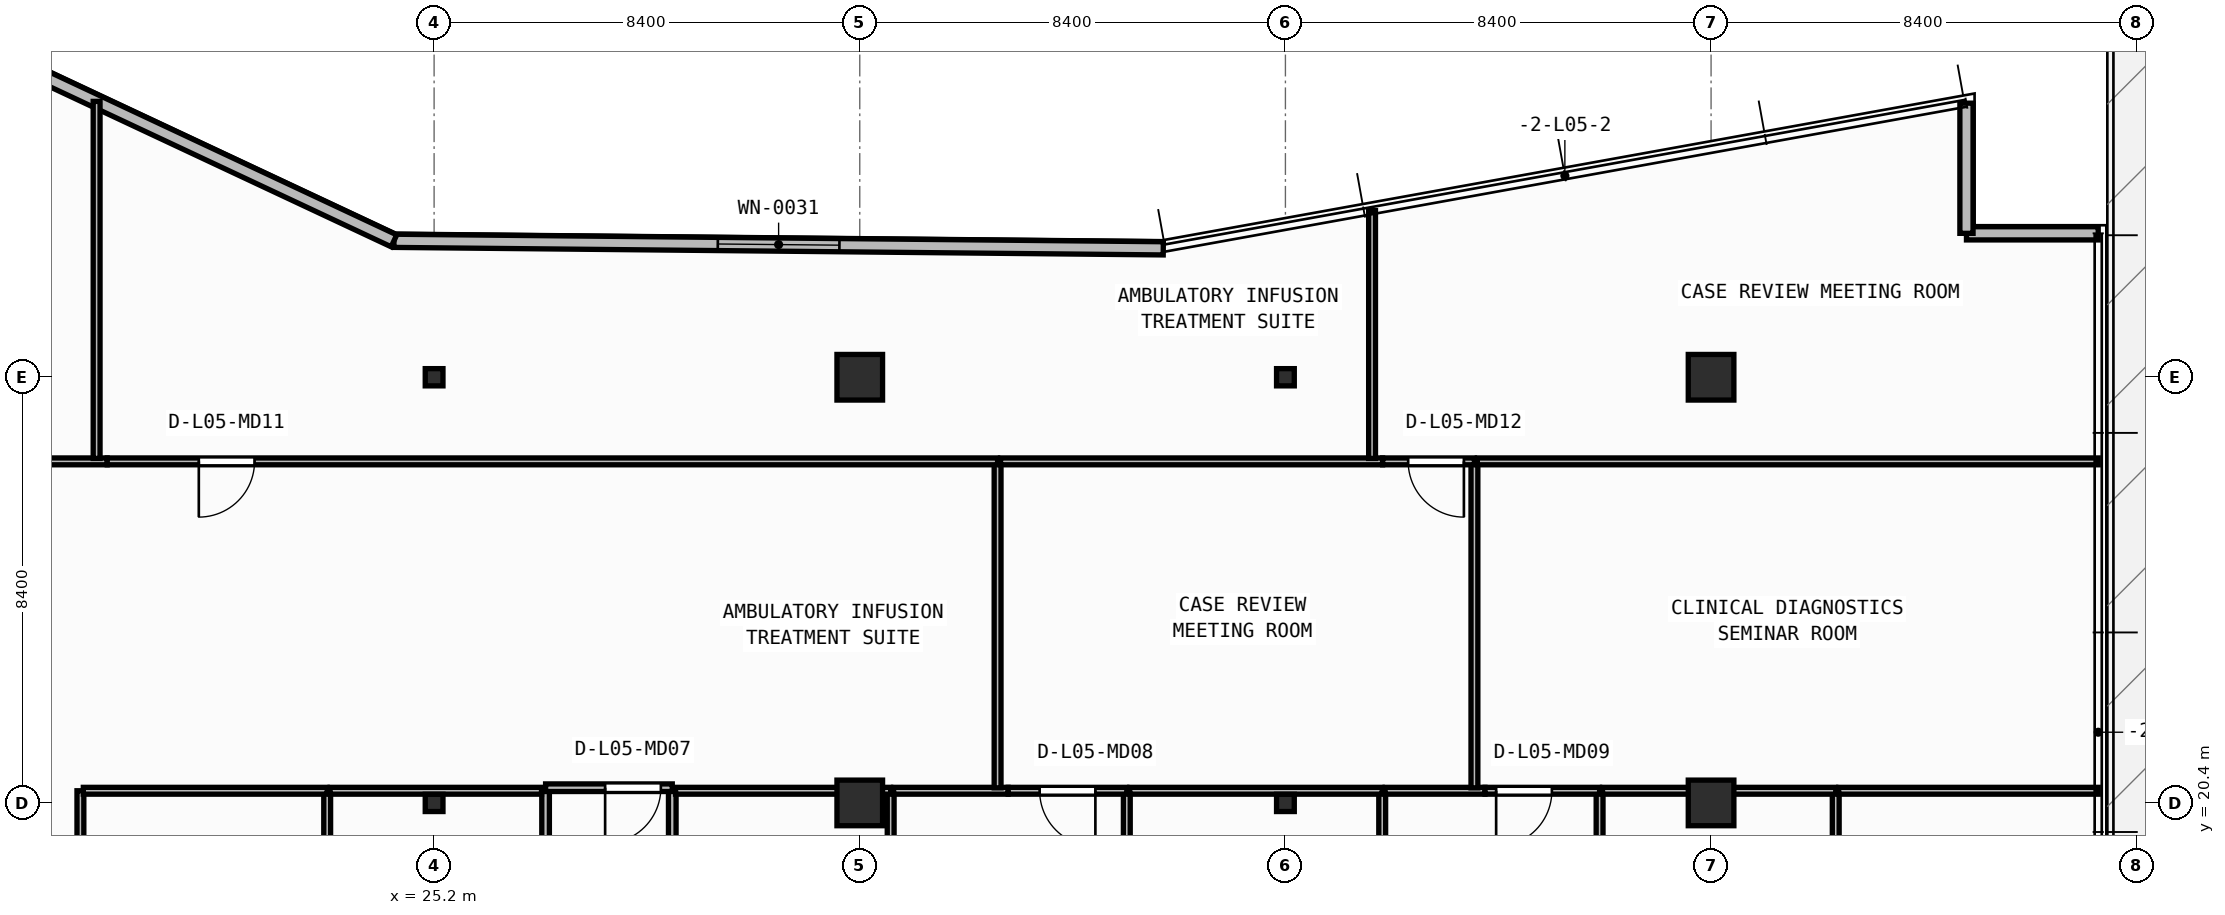
"""IFC4 building model, lengths in metres.
Left out: names, types, materials, properties, quantities, classifications, styles, units other than length and angle.
Written with IfcOpenShell. Run it as: python <this file> out.ifc"""

import sys

from ifc_helpers import new_model, si_unit, direction, frame, frame_2d, origin, origin_2d, place, context, subcontext, project, spatial, rectangle, i_section, extrude, element, fill, save


model = new_model("IFC4")
c1 = context("Model", 3, precision=1e-05, world=origin(), true_north=direction((0.0, 1.0)))
c2 = subcontext(c1, "Body", "Model", "MODEL_VIEW")
j1 = project(units=[si_unit("LENGTHUNIT", "METRE"), si_unit("PLANEANGLEUNIT", "RADIAN")], contexts=[c1])
p1 = place(None, origin())
s1 = spatial("IfcSite", under=j1, at=p1, CompositionType="ELEMENT")
p2 = place(p1, origin())
s2 = spatial("IfcBuilding", under=s1, at=p2, CompositionType="ELEMENT")
p3 = place(p2, frame((0.0, 0.0, 22.5)))
s3 = spatial("IfcBuildingStorey", under=s2, at=p3, CompositionType="ELEMENT", Elevation=22.5)
p4 = place(p3, frame((25.2, 20.4, 0.0), z_axis=(0.0, 0.0, 1.0), x_axis=(1.0, 0.0, 0.0)))
e1 = element("IfcColumn", 1, at=p4, inside=s3, PredefinedType="COLUMN", context=c2, shape_type="SweptSolid", body=[
    extrude(i_section(OverallWidth=0.35, OverallDepth=0.34, WebThickness=0.016, FlangeThickness=0.028, at=origin_2d()), origin(), (0.0, 0.0, 1.0), 3.95),
])
p5 = place(p3, frame((33.6, 20.4, 0.0), z_axis=(0.0, 0.0, 1.0), x_axis=(1.0, 0.0, 0.0)))
e2 = element("IfcColumn", 2, at=p5, inside=s3, PredefinedType="COLUMN", context=c2, shape_type="SweptSolid", body=[
    extrude(rectangle(XDim=0.9, YDim=0.9, at=origin_2d()), origin(), (0.0, 0.0, 1.0), 3.95),
])
p6 = place(p3, frame((42.0, 20.4, 0.0), z_axis=(0.0, 0.0, 1.0), x_axis=(1.0, 0.0, 0.0)))
e3 = element("IfcColumn", 3, at=p6, inside=s3, PredefinedType="COLUMN", context=c2, shape_type="SweptSolid", body=[
    extrude(i_section(OverallWidth=0.35, OverallDepth=0.34, WebThickness=0.016, FlangeThickness=0.028, at=origin_2d()), origin(), (0.0, 0.0, 1.0), 3.95),
])
p7 = place(p3, frame((50.4, 20.4, 0.0), z_axis=(0.0, 0.0, 1.0), x_axis=(1.0, 0.0, 0.0)))
e4 = element("IfcColumn", 4, at=p7, inside=s3, PredefinedType="COLUMN", context=c2, shape_type="SweptSolid", body=[
    extrude(rectangle(XDim=0.9, YDim=0.9, at=origin_2d()), origin(), (0.0, 0.0, 1.0), 3.95),
])
p8 = place(p3, frame((25.2, 28.8, 0.0), z_axis=(0.0, 0.0, 1.0), x_axis=(1.0, 0.0, 0.0)))
e5 = element("IfcColumn", 5, at=p8, inside=s3, PredefinedType="COLUMN", context=c2, shape_type="SweptSolid", body=[
    extrude(i_section(OverallWidth=0.35, OverallDepth=0.34, WebThickness=0.016, FlangeThickness=0.028, at=origin_2d()), origin(), (0.0, 0.0, 1.0), 3.95),
])
p9 = place(p3, frame((33.6, 28.8, 0.0), z_axis=(0.0, 0.0, 1.0), x_axis=(1.0, 0.0, 0.0)))
e6 = element("IfcColumn", 6, at=p9, inside=s3, PredefinedType="COLUMN", context=c2, shape_type="SweptSolid", body=[
    extrude(rectangle(XDim=0.9, YDim=0.9, at=origin_2d()), origin(), (0.0, 0.0, 1.0), 3.95),
])
p10 = place(p3, frame((42.0, 28.8, 0.0), z_axis=(0.0, 0.0, 1.0), x_axis=(1.0, 0.0, 0.0)))
e7 = element("IfcColumn", 7, at=p10, inside=s3, PredefinedType="COLUMN", context=c2, shape_type="SweptSolid", body=[
    extrude(i_section(OverallWidth=0.35, OverallDepth=0.34, WebThickness=0.016, FlangeThickness=0.028, at=origin_2d()), origin(), (0.0, 0.0, 1.0), 3.95),
])
p11 = place(p3, frame((50.4, 28.8, 0.0), z_axis=(0.0, 0.0, 1.0), x_axis=(1.0, 0.0, 0.0)))
e8 = element("IfcColumn", 8, at=p11, inside=s3, PredefinedType="COLUMN", context=c2, shape_type="SweptSolid", body=[
    extrude(rectangle(XDim=0.9, YDim=0.9, at=origin_2d()), origin(), (0.0, 0.0, 1.0), 3.95),
])
p12 = place(p3, frame((58.04, 31.64, 0.0), z_axis=(0.0, 0.0, 1.0), x_axis=(-1.0, 0.0, 0.0)))
e9 = element("IfcWall", 9, at=p12, inside=s3, PredefinedType="STANDARD", context=c2, shape_type="SweptSolid", body=[
    extrude(rectangle(XDim=2.6, YDim=0.26, at=frame_2d((1.3, 0.0))), origin(), (0.0, 0.0, 1.0), 3.71),
])
p13 = place(p3, frame((55.44, 31.64, 0.0), z_axis=(0.0, 0.0, 1.0), x_axis=(0.0, 1.0, 0.0)))
e10 = element("IfcWall", 10, at=p13, inside=s3, PredefinedType="STANDARD", context=c2, shape_type="SweptSolid", body=[
    extrude(rectangle(XDim=2.569, YDim=0.26, at=frame_2d((1.284, 0.0))), origin(), (0.0, 0.0, 1.0), 3.71),
])
p14 = place(p3, frame((39.59, 31.344, 0.0), z_axis=(0.0, 0.0, 1.0), x_axis=(-0.999952362926, 0.009760731435, 0.0)))
e11 = element("IfcWall", 11, at=p14, inside=s3, PredefinedType="STANDARD", context=c2, shape_type="SweptSolid", body=[
    extrude(rectangle(XDim=15.183, YDim=0.26, at=frame_2d((7.591, 0.0))), origin(), (0.0, 0.0, 1.0), 3.71),
])
p15 = place(p14, frame((6.391, 0.0, 0.9)))
e12 = element("IfcOpeningElement", 12, at=p15, cuts=e11, PredefinedType="OPENING", context=c2, shape_type="SweptSolid", body=[
    extrude(rectangle(XDim=2.4, YDim=1.65, at=frame_2d((1.2, 0.825))), frame((0.0, 0.14, 0.0), z_axis=(0.0, -1.0, 0.0), x_axis=(1.0, 0.0, 0.0)), (0.0, 0.0, 1.0), 0.28),
])
p16 = place(p3, frame((24.408, 31.492, 0.0), z_axis=(0.0, 0.0, 1.0), x_axis=(-0.905396522918, 0.424566998585, 0.0)))
e13 = element("IfcWall", 13, at=p16, inside=s3, PredefinedType="STANDARD", context=c2, shape_type="SweptSolid", body=[
    extrude(rectangle(XDim=14.189, YDim=0.26, at=frame_2d((7.095, 0.0))), origin(), (0.0, 0.0, 1.0), 3.71),
])
p17 = place(p16, frame((9.145, 0.0, 0.9)))
e14 = element("IfcOpeningElement", 14, at=p17, cuts=e13, PredefinedType="OPENING", context=c2, shape_type="SweptSolid", body=[
    extrude(rectangle(XDim=2.4, YDim=1.65, at=frame_2d((1.2, 0.825))), frame((0.0, 0.14, 0.0), z_axis=(0.0, -1.0, 0.0), x_axis=(1.0, 0.0, 0.0)), (0.0, 0.0, 1.0), 0.28),
])
for number, where, z_axis, x_axis in (
    (15, (27.4, 20.7, 0.0), (0.0, 0.0, 1.0), (0.0, -1.0, 0.0)),
    (16, (29.9, 14.7, 0.0), (0.0, 0.0, 1.0), (0.0, 1.0, 0.0)),
):
    element("IfcWall", number, at=place(p3, frame(where, z_axis=z_axis, x_axis=x_axis)), inside=s3, PredefinedType="PARTITIONING", context=c2, shape_type="SweptSolid", body=[
        extrude(rectangle(XDim=6.0, YDim=0.15, at=frame_2d((3.0, 0.0))), origin(), (0.0, 0.0, 1.0), 3.71),
    ])
p18 = place(p3, frame((29.9, 20.7, 0.0), z_axis=(0.0, 0.0, 1.0), x_axis=(-1.0, 0.0, 0.0)))
e17 = element("IfcWall", 17, at=p18, inside=s3, PredefinedType="PARTITIONING", context=c2, shape_type="SweptSolid", body=[
    extrude(rectangle(XDim=2.5, YDim=0.15, at=frame_2d((1.25, 0.0))), origin(), (0.0, 0.0, 1.0), 3.073),
])
p19 = place(p18, frame((0.225, 0.0, 0.0)))
e18 = element("IfcOpeningElement", 18, at=p19, cuts=e17, PredefinedType="OPENING", context=c2, shape_type="SweptSolid", body=[
    extrude(rectangle(XDim=1.1, YDim=2.1, at=frame_2d((0.55, 1.05))), frame((0.0, 0.085, 0.0), z_axis=(0.0, -1.0, 0.0), x_axis=(1.0, 0.0, 0.0)), (0.0, 0.0, 1.0), 0.17),
])
p20 = place(p3, frame((18.22, 17.833, 0.0), z_axis=(0.0, 0.0, 1.0), x_axis=(0.0, 1.0, 0.0)))
e19 = element("IfcWall", 19, at=p20, inside=s3, PredefinedType="PARTITIONING", context=c2, shape_type="SweptSolid", body=[
    extrude(rectangle(XDim=2.807, YDim=0.135, at=frame_2d((1.404, 0.0))), origin(), (0.0, 0.0, 1.0), 3.71),
])
p21 = place(p3, frame((23.09, 14.76, 0.0), z_axis=(0.0, 0.0, 1.0), x_axis=(0.0, 1.0, 0.0)))
e20 = element("IfcWall", 20, at=p21, inside=s3, PredefinedType="PARTITIONING", context=c2, shape_type="SweptSolid", body=[
    extrude(rectangle(XDim=5.88, YDim=0.135, at=frame_2d((2.94, 0.0))), origin(), (0.0, 0.0, 1.0), 3.71),
])
p22 = place(p3, frame((23.09, 20.64, 0.0), z_axis=(0.0, 0.0, 1.0), x_axis=(-1.0, 0.0, 0.0)))
e21 = element("IfcWall", 21, at=p22, inside=s3, PredefinedType="PARTITIONING", context=c2, shape_type="SweptSolid", body=[
    extrude(rectangle(XDim=4.812, YDim=0.135, at=frame_2d((2.406, 0.0))), origin(), (0.0, 0.0, 1.0), 3.073),
])
p23 = place(p3, frame((27.32, 20.64, 0.0), z_axis=(0.0, 0.0, 1.0), x_axis=(-1.0, 0.0, 0.0)))
e22 = element("IfcWall", 22, at=p23, inside=s3, PredefinedType="PARTITIONING", context=c2, shape_type="SweptSolid", body=[
    extrude(rectangle(XDim=4.173, YDim=0.135, at=frame_2d((2.086, 0.0))), origin(), (0.0, 0.0, 1.0), 3.073),
])
p24 = place(p3, frame((34.21, 17.833, 0.0), z_axis=(0.0, 0.0, 1.0), x_axis=(0.0, 1.0, 0.0)))
e23 = element("IfcWall", 23, at=p24, inside=s3, PredefinedType="PARTITIONING", context=c2, shape_type="SweptSolid", body=[
    extrude(rectangle(XDim=2.807, YDim=0.135, at=frame_2d((1.404, 0.0))), origin(), (0.0, 0.0, 1.0), 3.71),
])
p25 = place(p3, frame((34.21, 20.64, 0.0), z_axis=(0.0, 0.0, 1.0), x_axis=(-1.0, 0.0, 0.0)))
e24 = element("IfcWall", 24, at=p25, inside=s3, PredefinedType="PARTITIONING", context=c2, shape_type="SweptSolid", body=[
    extrude(rectangle(XDim=4.245, YDim=0.135, at=frame_2d((2.123, 0.0))), origin(), (0.0, 0.0, 1.0), 3.073),
])
p26 = place(p3, frame((38.87, 14.76, 0.0), z_axis=(0.0, 0.0, 1.0), x_axis=(0.0, 1.0, 0.0)))
e25 = element("IfcWall", 25, at=p26, inside=s3, PredefinedType="PARTITIONING", context=c2, shape_type="SweptSolid", body=[
    extrude(rectangle(XDim=5.88, YDim=0.135, at=frame_2d((2.94, 0.0))), origin(), (0.0, 0.0, 1.0), 3.71),
])
p27 = place(p3, frame((36.528, 20.64, 0.0), z_axis=(0.0, 0.0, 1.0), x_axis=(-1.0, 0.0, 0.0)))
e26 = element("IfcWall", 26, at=p27, inside=s3, PredefinedType="PARTITIONING", context=c2, shape_type="SweptSolid", body=[
    extrude(rectangle(XDim=2.26, YDim=0.135, at=frame_2d((1.13, 0.0))), origin(), (0.0, 0.0, 1.0), 3.073),
])
p28 = place(p3, frame((38.87, 20.64, 0.0), z_axis=(0.0, 0.0, 1.0), x_axis=(-1.0, 0.0, 0.0)))
e27 = element("IfcWall", 27, at=p28, inside=s3, PredefinedType="PARTITIONING", context=c2, shape_type="SweptSolid", body=[
    extrude(rectangle(XDim=2.341, YDim=0.135, at=frame_2d((1.17, 0.0))), origin(), (0.0, 0.0, 1.0), 3.073),
])
p29 = place(p28, frame((0.62, 0.0, 0.0)))
e28 = element("IfcOpeningElement", 28, at=p29, cuts=e27, PredefinedType="OPENING", context=c2, shape_type="SweptSolid", body=[
    extrude(rectangle(XDim=1.1, YDim=2.1, at=frame_2d((0.55, 1.05))), frame((0.0, 0.077, 0.0), z_axis=(0.0, -1.0, 0.0), x_axis=(1.0, 0.0, 0.0)), (0.0, 0.0, 1.0), 0.155),
])
p30 = place(p3, frame((43.91, 17.833, 0.0), z_axis=(0.0, 0.0, 1.0), x_axis=(0.0, 1.0, 0.0)))
e29 = element("IfcWall", 29, at=p30, inside=s3, PredefinedType="PARTITIONING", context=c2, shape_type="SweptSolid", body=[
    extrude(rectangle(XDim=2.807, YDim=0.135, at=frame_2d((1.404, 0.0))), origin(), (0.0, 0.0, 1.0), 3.71),
])
p31 = place(p3, frame((43.91, 20.64, 0.0), z_axis=(0.0, 0.0, 1.0), x_axis=(-1.0, 0.0, 0.0)))
e30 = element("IfcWall", 30, at=p31, inside=s3, PredefinedType="PARTITIONING", context=c2, shape_type="SweptSolid", body=[
    extrude(rectangle(XDim=4.982, YDim=0.135, at=frame_2d((2.491, 0.0))), origin(), (0.0, 0.0, 1.0), 3.073),
])
p32 = place(p3, frame((48.2, 14.76, 0.0), z_axis=(0.0, 0.0, 1.0), x_axis=(0.0, 1.0, 0.0)))
e31 = element("IfcWall", 31, at=p32, inside=s3, PredefinedType="PARTITIONING", context=c2, shape_type="SweptSolid", body=[
    extrude(rectangle(XDim=5.88, YDim=0.135, at=frame_2d((2.94, 0.0))), origin(), (0.0, 0.0, 1.0), 3.71),
])
p33 = place(p3, frame((45.938, 20.64, 0.0), z_axis=(0.0, 0.0, 1.0), x_axis=(-1.0, 0.0, 0.0)))
e32 = element("IfcWall", 32, at=p33, inside=s3, PredefinedType="PARTITIONING", context=c2, shape_type="SweptSolid", body=[
    extrude(rectangle(XDim=1.97, YDim=0.135, at=frame_2d((0.985, 0.0))), origin(), (0.0, 0.0, 1.0), 3.073),
])
p34 = place(p3, frame((48.2, 20.64, 0.0), z_axis=(0.0, 0.0, 1.0), x_axis=(-1.0, 0.0, 0.0)))
e33 = element("IfcWall", 33, at=p34, inside=s3, PredefinedType="PARTITIONING", context=c2, shape_type="SweptSolid", body=[
    extrude(rectangle(XDim=2.26, YDim=0.135, at=frame_2d((1.13, 0.0))), origin(), (0.0, 0.0, 1.0), 3.073),
])
p35 = place(p34, frame((0.941, 0.0, 0.0)))
e34 = element("IfcOpeningElement", 34, at=p35, cuts=e33, PredefinedType="OPENING", context=c2, shape_type="SweptSolid", body=[
    extrude(rectangle(XDim=1.1, YDim=2.1, at=frame_2d((0.55, 1.05))), frame((0.0, 0.077, 0.0), z_axis=(0.0, -1.0, 0.0), x_axis=(1.0, 0.0, 0.0)), (0.0, 0.0, 1.0), 0.155),
])
p36 = place(p3, frame((52.86, 17.833, 0.0), z_axis=(0.0, 0.0, 1.0), x_axis=(0.0, 1.0, 0.0)))
e35 = element("IfcWall", 35, at=p36, inside=s3, PredefinedType="PARTITIONING", context=c2, shape_type="SweptSolid", body=[
    extrude(rectangle(XDim=2.807, YDim=0.135, at=frame_2d((1.404, 0.0))), origin(), (0.0, 0.0, 1.0), 3.71),
])
p37 = place(p3, frame((52.86, 20.64, 0.0), z_axis=(0.0, 0.0, 1.0), x_axis=(-1.0, 0.0, 0.0)))
e36 = element("IfcWall", 36, at=p37, inside=s3, PredefinedType="PARTITIONING", context=c2, shape_type="SweptSolid", body=[
    extrude(rectangle(XDim=4.603, YDim=0.135, at=frame_2d((2.301, 0.0))), origin(), (0.0, 0.0, 1.0), 3.073),
])
p38 = place(p3, frame((58.04, 20.64, 0.0), z_axis=(0.0, 0.0, 1.0), x_axis=(-1.0, 0.0, 0.0)))
e37 = element("IfcWall", 37, at=p38, inside=s3, PredefinedType="PARTITIONING", context=c2, shape_type="SweptSolid", body=[
    extrude(rectangle(XDim=5.123, YDim=0.135, at=frame_2d((2.561, 0.0))), origin(), (0.0, 0.0, 1.0), 3.71),
])
p39 = place(p3, frame((36.32, 20.698, 0.0), z_axis=(0.0, 0.0, 1.0), x_axis=(0.0, 1.0, 0.0)))
e38 = element("IfcWall", 38, at=p39, inside=s3, PredefinedType="PARTITIONING", context=c2, shape_type="SweptSolid", body=[
    extrude(rectangle(XDim=6.442, YDim=0.135, at=frame_2d((3.221, 0.0))), origin(), (0.0, 0.0, 1.0), 3.71),
])
p40 = place(p3, frame((18.748, 27.14, 0.0), z_axis=(0.0, 0.0, 1.0), x_axis=(-1.0, 0.0, 0.0)))
e39 = element("IfcWall", 39, at=p40, inside=s3, PredefinedType="PARTITIONING", context=c2, shape_type="SweptSolid", body=[
    extrude(rectangle(XDim=1.82, YDim=0.135, at=frame_2d((0.91, 0.0))), origin(), (0.0, 0.0, 1.0), 3.71),
])
p41 = place(p3, frame((36.32, 27.14, 0.0), z_axis=(0.0, 0.0, 1.0), x_axis=(-1.0, 0.0, 0.0)))
e40 = element("IfcWall", 40, at=p41, inside=s3, PredefinedType="PARTITIONING", context=c2, shape_type="SweptSolid", body=[
    extrude(rectangle(XDim=17.571, YDim=0.135, at=frame_2d((8.785, 0.0))), origin(), (0.0, 0.0, 1.0), 3.71),
])
p42 = place(p41, frame((14.663, 0.0, 0.0)))
e41 = element("IfcOpeningElement", 41, at=p42, cuts=e40, PredefinedType="OPENING", context=c2, shape_type="SweptSolid", body=[
    extrude(rectangle(XDim=1.1, YDim=2.1, at=frame_2d((0.55, 1.05))), frame((0.0, 0.077, 0.0), z_axis=(0.0, -1.0, 0.0), x_axis=(1.0, 0.0, 0.0)), (0.0, 0.0, 1.0), 0.155),
])
p43 = place(p3, frame((45.73, 20.698, 0.0), z_axis=(0.0, 0.0, 1.0), x_axis=(0.0, 1.0, 0.0)))
e42 = element("IfcWall", 42, at=p43, inside=s3, PredefinedType="PARTITIONING", context=c2, shape_type="SweptSolid", body=[
    extrude(rectangle(XDim=6.442, YDim=0.135, at=frame_2d((3.221, 0.0))), origin(), (0.0, 0.0, 1.0), 3.71),
])
p44 = place(p3, frame((43.917, 27.14, 0.0), z_axis=(0.0, 0.0, 1.0), x_axis=(-1.0, 0.0, 0.0)))
e43 = element("IfcWall", 43, at=p44, inside=s3, PredefinedType="PARTITIONING", context=c2, shape_type="SweptSolid", body=[
    extrude(rectangle(XDim=7.54, YDim=0.135, at=frame_2d((3.77, 0.0))), origin(), (0.0, 0.0, 1.0), 3.71),
])
p45 = place(p3, frame((45.73, 27.14, 0.0), z_axis=(0.0, 0.0, 1.0), x_axis=(-1.0, 0.0, 0.0)))
e44 = element("IfcWall", 44, at=p45, inside=s3, PredefinedType="PARTITIONING", context=c2, shape_type="SweptSolid", body=[
    extrude(rectangle(XDim=1.811, YDim=0.135, at=frame_2d((0.905, 0.0))), origin(), (0.0, 0.0, 1.0), 3.71),
])
p46 = place(p45, frame((0.208, 0.0, 0.0)))
e45 = element("IfcOpeningElement", 45, at=p46, cuts=e44, PredefinedType="OPENING", context=c2, shape_type="SweptSolid", body=[
    extrude(rectangle(XDim=1.1, YDim=2.1, at=frame_2d((0.55, 1.05))), frame((0.0, 0.077, 0.0), z_axis=(0.0, -1.0, 0.0), x_axis=(1.0, 0.0, 0.0)), (0.0, 0.0, 1.0), 0.155),
])
p47 = place(p3, frame((58.04, 27.14, 0.0), z_axis=(0.0, 0.0, 1.0), x_axis=(-1.0, 0.0, 0.0)))
e46 = element("IfcWall", 46, at=p47, inside=s3, PredefinedType="PARTITIONING", context=c2, shape_type="SweptSolid", body=[
    extrude(rectangle(XDim=12.252, YDim=0.135, at=frame_2d((6.126, 0.0))), origin(), (0.0, 0.0, 1.0), 3.71),
])
p48 = place(p3, frame((18.54, 27.198, 0.0), z_axis=(0.0, 0.0, 1.0), x_axis=(0.0, 1.0, 0.0)))
e47 = element("IfcWall", 47, at=p48, inside=s3, PredefinedType="PARTITIONING", context=c2, shape_type="SweptSolid", body=[
    extrude(rectangle(XDim=7.046, YDim=0.135, at=frame_2d((3.523, 0.0))), origin(), (0.0, 0.0, 1.0), 3.71),
])
p49 = place(p3, frame((43.71, 27.198, 0.0), z_axis=(0.0, 0.0, 1.0), x_axis=(0.0, 1.0, 0.0)))
e48 = element("IfcWall", 48, at=p49, inside=s3, PredefinedType="PARTITIONING", context=c2, shape_type="SweptSolid", body=[
    extrude(rectangle(XDim=4.891, YDim=0.135, at=frame_2d((2.445, 0.0))), origin(), (0.0, 0.0, 1.0), 3.71),
])
p50 = place(p15, origin())
e49 = element("IfcWindow", 49, at=p50, inside=s3, PartitioningType="SINGLE_PANEL", PredefinedType="WINDOW", context=c2, shape_type="SweptSolid", body=[
    extrude(rectangle(XDim=2.4, YDim=1.65, at=frame_2d((1.2, 0.825))), frame((0.0, 0.03, 0.0), z_axis=(0.0, -1.0, 0.0), x_axis=(1.0, 0.0, 0.0)), (0.0, 0.0, 1.0), 0.06),
])
fill(e12, e49)
p51 = place(p19, origin())
e50 = element("IfcDoor", 50, at=p51, inside=s3, OperationType="SINGLE_SWING_RIGHT", PredefinedType="DOOR", context=c2, shape_type="SweptSolid", body=[
    extrude(rectangle(XDim=1.1, YDim=2.1, at=frame_2d((0.55, 1.05))), frame((0.0, 0.025, 0.0), z_axis=(0.0, -1.0, 0.0), x_axis=(1.0, 0.0, 0.0)), (0.0, 0.0, 1.0), 0.05),
])
fill(e18, e50)
p52 = place(p29, origin())
e51 = element("IfcDoor", 51, at=p52, inside=s3, OperationType="SINGLE_SWING_LEFT", PredefinedType="DOOR", context=c2, shape_type="SweptSolid", body=[
    extrude(rectangle(XDim=1.1, YDim=2.1, at=frame_2d((0.55, 1.05))), frame((0.0, 0.025, 0.0), z_axis=(0.0, -1.0, 0.0), x_axis=(1.0, 0.0, 0.0)), (0.0, 0.0, 1.0), 0.05),
])
fill(e28, e51)
p53 = place(p35, origin())
e52 = element("IfcDoor", 52, at=p53, inside=s3, OperationType="SINGLE_SWING_RIGHT", PredefinedType="DOOR", context=c2, shape_type="SweptSolid", body=[
    extrude(rectangle(XDim=1.1, YDim=2.1, at=frame_2d((0.55, 1.05))), frame((0.0, 0.025, 0.0), z_axis=(0.0, -1.0, 0.0), x_axis=(1.0, 0.0, 0.0)), (0.0, 0.0, 1.0), 0.05),
])
fill(e34, e52)
p54 = place(p42, origin())
e53 = element("IfcDoor", 53, at=p54, inside=s3, OperationType="SINGLE_SWING_RIGHT", PredefinedType="DOOR", context=c2, shape_type="SweptSolid", body=[
    extrude(rectangle(XDim=1.1, YDim=2.1, at=frame_2d((0.55, 1.05))), frame((0.0, 0.025, 0.0), z_axis=(0.0, -1.0, 0.0), x_axis=(1.0, 0.0, 0.0)), (0.0, 0.0, 1.0), 0.05),
])
fill(e41, e53)
p55 = place(p46, origin())
e54 = element("IfcDoor", 54, at=p55, inside=s3, OperationType="SINGLE_SWING_LEFT", PredefinedType="DOOR", context=c2, shape_type="SweptSolid", body=[
    extrude(rectangle(XDim=1.1, YDim=2.1, at=frame_2d((0.55, 1.05))), frame((0.0, 0.025, 0.0), z_axis=(0.0, -1.0, 0.0), x_axis=(1.0, 0.0, 0.0)), (0.0, 0.0, 1.0), 0.05),
])
fill(e45, e54)
save(model, sys.argv[1])
